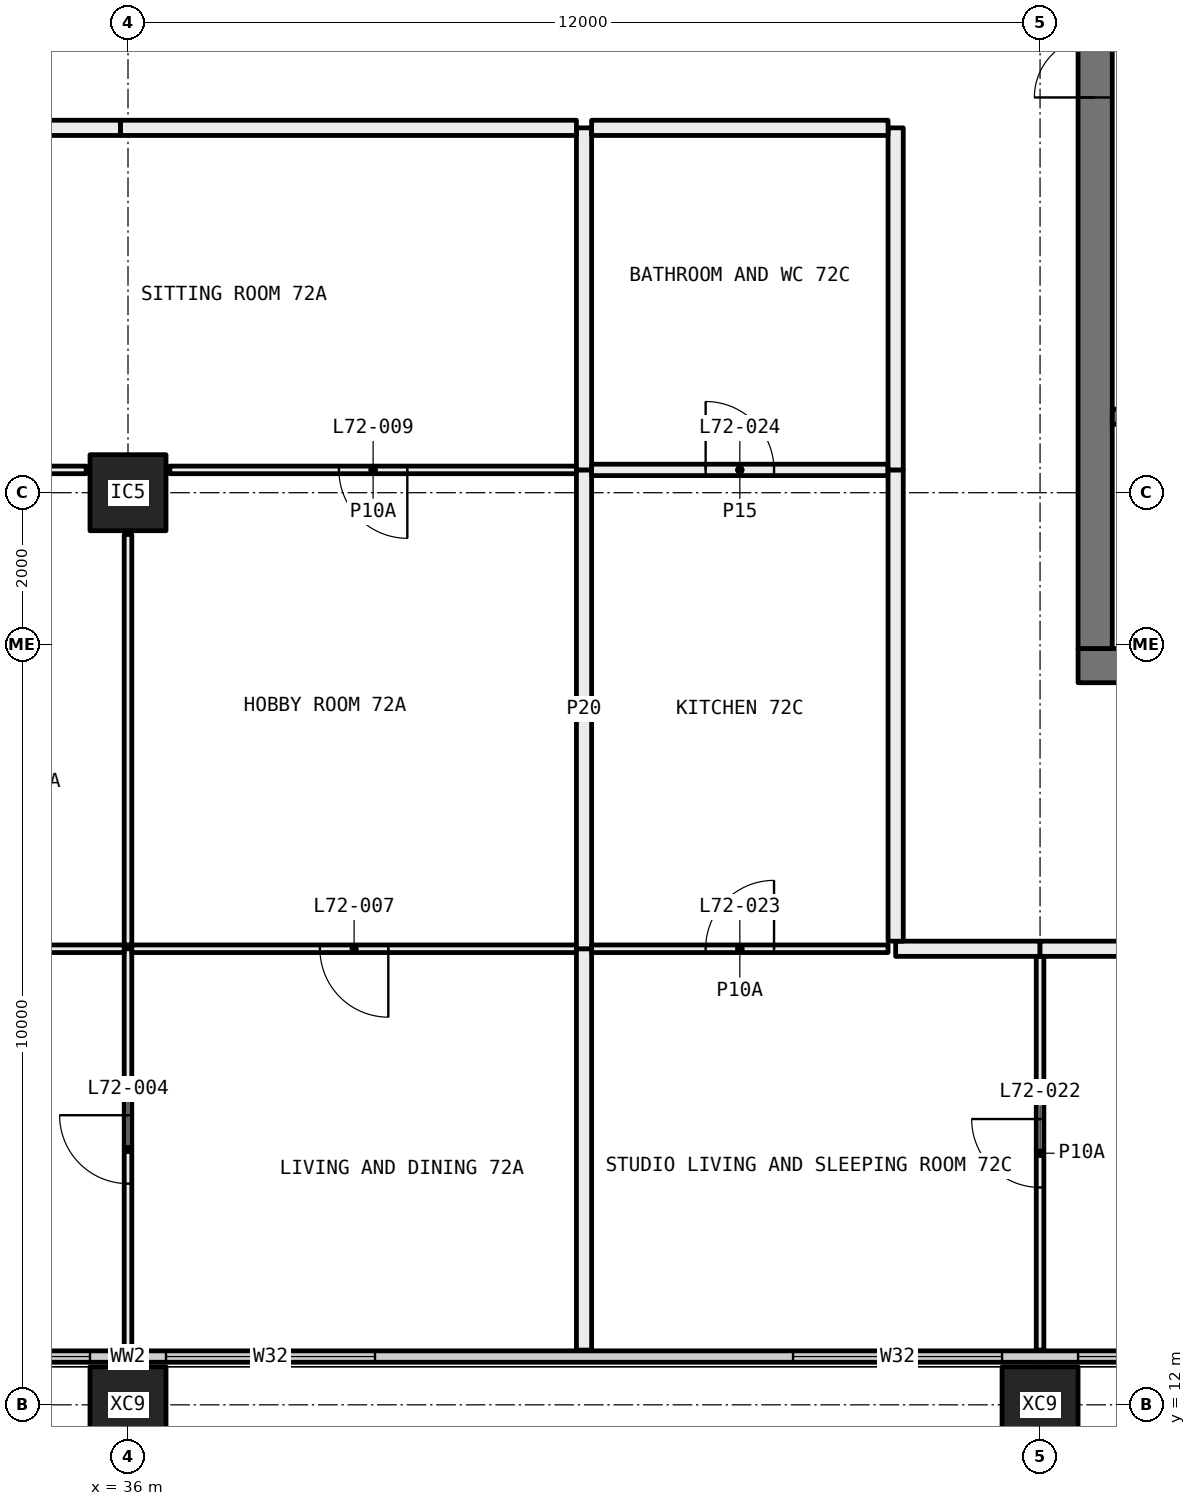
"""IFC4 building model, lengths in metres.
Left out: names, types, materials, properties, quantities, classifications, styles, units other than length and angle.
Written with IfcOpenShell. Run it as: python <this file> out.ifc"""

import sys

from ifc_helpers import new_model, si_unit, direction, frame, frame_2d, origin, origin_2d, place, context, subcontext, project, spatial, rectangle, hollow_rectangle, extrude, element, fill, save


model = new_model("IFC4")
c1 = context("Model", 3, precision=1e-05, world=origin(), true_north=direction((0.0, 1.0)))
c2 = subcontext(c1, "Body", "Model", "MODEL_VIEW")
j1 = project(units=[si_unit("LENGTHUNIT", "METRE"), si_unit("PLANEANGLEUNIT", "RADIAN")], contexts=[c1])
p1 = place(None, origin())
s1 = spatial("IfcSite", under=j1, at=p1, CompositionType="ELEMENT")
p2 = place(p1, origin())
s2 = spatial("IfcBuilding", under=s1, at=p2, CompositionType="ELEMENT")
p3 = place(p2, frame((0.0, 0.0, 266.25)))
s3 = spatial("IfcBuildingStorey", under=s2, at=p3, CompositionType="ELEMENT", Elevation=266.25)
p4 = place(p3, frame((36.0, 12.0, -0.4), z_axis=(0.0, 0.0, 1.0), x_axis=(1.0, 0.0, 0.0)))
e1 = element("IfcColumn", 1, at=p4, inside=s3, PredefinedType="COLUMN", context=c2, shape_type="SweptSolid", body=[
    extrude(hollow_rectangle(XDim=1.0, YDim=1.0, WallThickness=0.036, at=origin_2d()), origin(), (0.0, 0.0, 1.0), 3.45),
])
p5 = place(p3, frame((36.0, 24.0, 0.0), z_axis=(0.0, 0.0, 1.0), x_axis=(1.0, 0.0, 0.0)))
e2 = element("IfcColumn", 2, at=p5, inside=s3, PredefinedType="COLUMN", context=c2, shape_type="SweptSolid", body=[
    extrude(hollow_rectangle(XDim=1.0, YDim=1.0, WallThickness=0.04, at=origin_2d()), origin(), (0.0, 0.0, 1.0), 3.05),
])
p6 = place(p3, frame((48.0, 12.0, -0.4), z_axis=(0.0, 0.0, 1.0), x_axis=(1.0, 0.0, 0.0)))
e3 = element("IfcColumn", 3, at=p6, inside=s3, PredefinedType="COLUMN", context=c2, shape_type="SweptSolid", body=[
    extrude(hollow_rectangle(XDim=1.0, YDim=1.0, WallThickness=0.036, at=origin_2d()), origin(), (0.0, 0.0, 1.0), 3.45),
])
p7 = place(p3, frame((18.56, 12.635, 0.0), z_axis=(0.0, 0.0, 1.0), x_axis=(1.0, 0.0, 0.0)))
e4 = element("IfcWall", 4, at=p7, inside=s3, PredefinedType="ELEMENTEDWALL", context=c2, shape_type="SweptSolid", body=[
    extrude(rectangle(XDim=34.88, YDim=0.15, at=frame_2d((17.44, 0.0))), origin(), (0.0, 0.0, 1.0), 3.05),
])
p8 = place(p7, frame((0.44, 0.0, 0.45)))
e5 = element("IfcOpeningElement", 5, at=p8, cuts=e4, PredefinedType="OPENING", context=c2, shape_type="SweptSolid", body=[
    extrude(rectangle(XDim=4.5, YDim=2.55, at=frame_2d((2.25, 1.275))), frame((0.0, 0.085, 0.0), z_axis=(0.0, -1.0, 0.0), x_axis=(1.0, 0.0, 0.0)), (0.0, 0.0, 1.0), 0.17),
])
p9 = place(p7, frame((5.94, 0.0, 0.45)))
e6 = element("IfcOpeningElement", 6, at=p9, cuts=e4, PredefinedType="OPENING", context=c2, shape_type="SweptSolid", body=[
    extrude(rectangle(XDim=2.75, YDim=2.55, at=frame_2d((1.375, 1.275))), frame((0.0, 0.085, 0.0), z_axis=(0.0, -1.0, 0.0), x_axis=(1.0, 0.0, 0.0)), (0.0, 0.0, 1.0), 0.17),
])
p10 = place(p7, frame((14.94, 0.0, 0.45)))
e7 = element("IfcOpeningElement", 7, at=p10, cuts=e4, PredefinedType="OPENING", context=c2, shape_type="SweptSolid", body=[
    extrude(rectangle(XDim=2.0, YDim=2.55, at=frame_2d((1.0, 1.275))), frame((0.0, 0.085, 0.0), z_axis=(0.0, -1.0, 0.0), x_axis=(1.0, 0.0, 0.0)), (0.0, 0.0, 1.0), 0.17),
])
p11 = place(p7, frame((17.94, 0.0, 0.45)))
e8 = element("IfcOpeningElement", 8, at=p11, cuts=e4, PredefinedType="OPENING", context=c2, shape_type="SweptSolid", body=[
    extrude(rectangle(XDim=2.75, YDim=2.55, at=frame_2d((1.375, 1.275))), frame((0.0, 0.085, 0.0), z_axis=(0.0, -1.0, 0.0), x_axis=(1.0, 0.0, 0.0)), (0.0, 0.0, 1.0), 0.17),
])
p12 = place(p7, frame((26.19, 0.0, 0.45)))
e9 = element("IfcOpeningElement", 9, at=p12, cuts=e4, PredefinedType="OPENING", context=c2, shape_type="SweptSolid", body=[
    extrude(rectangle(XDim=2.75, YDim=2.55, at=frame_2d((1.375, 1.275))), frame((0.0, 0.085, 0.0), z_axis=(0.0, -1.0, 0.0), x_axis=(1.0, 0.0, 0.0)), (0.0, 0.0, 1.0), 0.17),
])
p13 = place(p7, frame((29.94, 0.0, 0.45)))
e10 = element("IfcOpeningElement", 10, at=p13, cuts=e4, PredefinedType="OPENING", context=c2, shape_type="SweptSolid", body=[
    extrude(rectangle(XDim=4.5, YDim=2.55, at=frame_2d((2.25, 1.275))), frame((0.0, 0.085, 0.0), z_axis=(0.0, -1.0, 0.0), x_axis=(1.0, 0.0, 0.0)), (0.0, 0.0, 1.0), 0.17),
])
p14 = place(p3, frame((36.0, 12.72, 0.0), z_axis=(0.0, 0.0, 1.0), x_axis=(0.0, 1.0, 0.0)))
e11 = element("IfcWall", 11, at=p14, inside=s3, PredefinedType="PARTITIONING", context=c2, shape_type="SweptSolid", body=[
    extrude(rectangle(XDim=5.28, YDim=0.1, at=frame_2d((2.64, 0.0))), origin(), (0.0, 0.0, 1.0), 2.45),
])
p15 = place(p14, frame((2.19, 0.0, 0.0)))
e12 = element("IfcOpeningElement", 12, at=p15, cuts=e11, PredefinedType="OPENING", context=c2, shape_type="SweptSolid", body=[
    extrude(rectangle(XDim=0.9, YDim=2.1, at=frame_2d((0.45, 1.05))), frame((0.0, 0.06, 0.0), z_axis=(0.0, -1.0, 0.0), x_axis=(1.0, 0.0, 0.0)), (0.0, 0.0, 1.0), 0.12),
])
p16 = place(p3, frame((35.95, 18.0, 0.0), z_axis=(0.0, 0.0, 1.0), x_axis=(-1.0, 0.0, 0.0)))
e13 = element("IfcWall", 13, at=p16, inside=s3, PredefinedType="PARTITIONING", context=c2, shape_type="SweptSolid", body=[
    extrude(rectangle(XDim=4.45, YDim=0.1, at=frame_2d((2.225, 0.0))), origin(), (0.0, 0.0, 1.0), 2.45),
])
p17 = place(p3, frame((41.9, 18.0, 0.0), z_axis=(0.0, 0.0, 1.0), x_axis=(-1.0, 0.0, 0.0)))
e14 = element("IfcWall", 14, at=p17, inside=s3, PredefinedType="PARTITIONING", context=c2, shape_type="SweptSolid", body=[
    extrude(rectangle(XDim=5.85, YDim=0.1, at=frame_2d((2.925, 0.0))), origin(), (0.0, 0.0, 1.0), 2.45),
])
p18 = place(p17, frame((2.475, 0.0, 0.0)))
e15 = element("IfcOpeningElement", 15, at=p18, cuts=e14, PredefinedType="OPENING", context=c2, shape_type="SweptSolid", body=[
    extrude(rectangle(XDim=0.9, YDim=2.1, at=frame_2d((0.45, 1.05))), frame((0.0, 0.06, 0.0), z_axis=(0.0, -1.0, 0.0), x_axis=(1.0, 0.0, 0.0)), (0.0, 0.0, 1.0), 0.12),
])
p19 = place(p3, frame((42.0, 12.72, 0.0), z_axis=(0.0, 0.0, 1.0), x_axis=(0.0, 1.0, 0.0)))
e16 = element("IfcWall", 16, at=p19, inside=s3, PredefinedType="PARTITIONING", context=c2, shape_type="SweptSolid", body=[
    extrude(rectangle(XDim=5.28, YDim=0.2, at=frame_2d((2.64, 0.0))), origin(), (0.0, 0.0, 1.0), 3.05),
])
p20 = place(p3, frame((36.0, 18.05, 0.0), z_axis=(0.0, 0.0, 1.0), x_axis=(0.0, 1.0, 0.0)))
e17 = element("IfcWall", 17, at=p20, inside=s3, PredefinedType="PARTITIONING", context=c2, shape_type="SweptSolid", body=[
    extrude(rectangle(XDim=5.4, YDim=0.1, at=frame_2d((2.7, 0.0))), origin(), (0.0, 0.0, 1.0), 2.45),
])
p21 = place(p3, frame((35.45, 24.3, 0.0), z_axis=(0.0, 0.0, 1.0), x_axis=(-1.0, 0.0, 0.0)))
e18 = element("IfcWall", 18, at=p21, inside=s3, PredefinedType="PARTITIONING", context=c2, shape_type="SweptSolid", body=[
    extrude(rectangle(XDim=3.9, YDim=0.1, at=frame_2d((1.95, 0.0))), origin(), (0.0, 0.0, 1.0), 3.05),
])
p22 = place(p3, frame((41.9, 24.3, 0.0), z_axis=(0.0, 0.0, 1.0), x_axis=(-1.0, 0.0, 0.0)))
e19 = element("IfcWall", 19, at=p22, inside=s3, PredefinedType="PARTITIONING", context=c2, shape_type="SweptSolid", body=[
    extrude(rectangle(XDim=5.35, YDim=0.1, at=frame_2d((2.675, 0.0))), origin(), (0.0, 0.0, 1.0), 3.05),
])
p23 = place(p22, frame((2.225, 0.0, 0.0)))
e20 = element("IfcOpeningElement", 20, at=p23, cuts=e19, PredefinedType="OPENING", context=c2, shape_type="SweptSolid", body=[
    extrude(rectangle(XDim=0.9, YDim=2.1, at=frame_2d((0.45, 1.05))), frame((0.0, 0.06, 0.0), z_axis=(0.0, -1.0, 0.0), x_axis=(1.0, 0.0, 0.0)), (0.0, 0.0, 1.0), 0.12),
])
p24 = place(p3, frame((42.0, 18.0, 0.0), z_axis=(0.0, 0.0, 1.0), x_axis=(0.0, 1.0, 0.0)))
e21 = element("IfcWall", 21, at=p24, inside=s3, PredefinedType="PARTITIONING", context=c2, shape_type="SweptSolid", body=[
    extrude(rectangle(XDim=6.3, YDim=0.2, at=frame_2d((3.15, 0.0))), origin(), (0.0, 0.0, 1.0), 2.45),
])
p25 = place(p3, frame((42.0, 24.3, 0.0), z_axis=(0.0, 0.0, 1.0), x_axis=(0.0, 1.0, 0.0)))
e22 = element("IfcWall", 22, at=p25, inside=s3, PredefinedType="PARTITIONING", context=c2, shape_type="SweptSolid", body=[
    extrude(rectangle(XDim=4.5, YDim=0.2, at=frame_2d((2.25, 0.0))), origin(), (0.0, 0.0, 1.0), 3.05),
])
p26 = place(p3, frame((41.9, 28.8, 0.0), z_axis=(0.0, 0.0, 1.0), x_axis=(-1.0, 0.0, 0.0)))
e23 = element("IfcWall", 23, at=p26, inside=s3, PredefinedType="PARTITIONING", context=c2, shape_type="SweptSolid", body=[
    extrude(rectangle(XDim=6.0, YDim=0.2, at=frame_2d((3.0, 0.0))), origin(), (0.0, 0.0, 1.0), 2.45),
])
p27 = place(p3, frame((35.9, 28.8, 0.0), z_axis=(0.0, 0.0, 1.0), x_axis=(-1.0, 0.0, 0.0)))
e24 = element("IfcWall", 24, at=p27, inside=s3, PredefinedType="PARTITIONING", context=c2, shape_type="SweptSolid", body=[
    extrude(rectangle(XDim=5.9, YDim=0.2, at=frame_2d((2.95, 0.0))), origin(), (0.0, 0.0, 1.0), 3.05),
])
p28 = place(p3, frame((48.0, 12.72, 0.0), z_axis=(0.0, 0.0, 1.0), x_axis=(0.0, 1.0, 0.0)))
e25 = element("IfcWall", 25, at=p28, inside=s3, PredefinedType="PARTITIONING", context=c2, shape_type="SweptSolid", body=[
    extrude(rectangle(XDim=5.18, YDim=0.1, at=frame_2d((2.59, 0.0))), origin(), (0.0, 0.0, 1.0), 3.05),
])
p29 = place(p28, frame((2.14, 0.0, 0.0)))
e26 = element("IfcOpeningElement", 26, at=p29, cuts=e25, PredefinedType="OPENING", context=c2, shape_type="SweptSolid", body=[
    extrude(rectangle(XDim=0.9, YDim=2.1, at=frame_2d((0.45, 1.05))), frame((0.0, 0.06, 0.0), z_axis=(0.0, -1.0, 0.0), x_axis=(1.0, 0.0, 0.0)), (0.0, 0.0, 1.0), 0.12),
])
p30 = place(p3, frame((46.0, 18.0, 0.0), z_axis=(0.0, 0.0, 1.0), x_axis=(-1.0, 0.0, 0.0)))
e27 = element("IfcWall", 27, at=p30, inside=s3, PredefinedType="PARTITIONING", context=c2, shape_type="SweptSolid", body=[
    extrude(rectangle(XDim=3.9, YDim=0.1, at=frame_2d((1.95, 0.0))), origin(), (0.0, 0.0, 1.0), 3.05),
])
p31 = place(p30, frame((1.5, 0.0, 0.0)))
e28 = element("IfcOpeningElement", 28, at=p31, cuts=e27, PredefinedType="OPENING", context=c2, shape_type="SweptSolid", body=[
    extrude(rectangle(XDim=0.9, YDim=2.1, at=frame_2d((0.45, 1.05))), frame((0.0, 0.06, 0.0), z_axis=(0.0, -1.0, 0.0), x_axis=(1.0, 0.0, 0.0)), (0.0, 0.0, 1.0), 0.12),
])
p32 = place(p3, frame((48.0, 18.0, 0.0), z_axis=(0.0, 0.0, 1.0), x_axis=(-1.0, 0.0, 0.0)))
e29 = element("IfcWall", 29, at=p32, inside=s3, PredefinedType="PARTITIONING", context=c2, shape_type="SweptSolid", body=[
    extrude(rectangle(XDim=1.9, YDim=0.2, at=frame_2d((0.95, 0.0))), origin(), (0.0, 0.0, 1.0), 3.05),
])
p33 = place(p3, frame((53.28, 18.0, 0.0), z_axis=(0.0, 0.0, 1.0), x_axis=(-1.0, 0.0, 0.0)))
e30 = element("IfcWall", 30, at=p33, inside=s3, PredefinedType="PARTITIONING", context=c2, shape_type="SweptSolid", body=[
    extrude(rectangle(XDim=5.28, YDim=0.2, at=frame_2d((2.64, 0.0))), origin(), (0.0, 0.0, 1.0), 3.05),
])
p34 = place(p33, frame((2.14, 0.0, 0.0)))
e31 = element("IfcOpeningElement", 31, at=p34, cuts=e30, PredefinedType="OPENING", context=c2, shape_type="SweptSolid", body=[
    extrude(rectangle(XDim=1.0, YDim=2.1, at=frame_2d((0.5, 1.05))), frame((0.0, 0.11, 0.0), z_axis=(0.0, -1.0, 0.0), x_axis=(1.0, 0.0, 0.0)), (0.0, 0.0, 1.0), 0.22),
])
p35 = place(p3, frame((46.0, 24.3, 0.0), z_axis=(0.0, 0.0, 1.0), x_axis=(-1.0, 0.0, 0.0)))
e32 = element("IfcWall", 32, at=p35, inside=s3, PredefinedType="PARTITIONING", context=c2, shape_type="SweptSolid", body=[
    extrude(rectangle(XDim=3.9, YDim=0.15, at=frame_2d((1.95, 0.0))), origin(), (0.0, 0.0, 1.0), 3.05),
])
p36 = place(p35, frame((1.5, 0.0, 0.0)))
e33 = element("IfcOpeningElement", 33, at=p36, cuts=e32, PredefinedType="OPENING", context=c2, shape_type="SweptSolid", body=[
    extrude(rectangle(XDim=0.9, YDim=2.1, at=frame_2d((0.45, 1.05))), frame((0.0, 0.085, 0.0), z_axis=(0.0, -1.0, 0.0), x_axis=(1.0, 0.0, 0.0)), (0.0, 0.0, 1.0), 0.17),
])
p37 = place(p3, frame((46.1, 18.1, 0.0), z_axis=(0.0, 0.0, 1.0), x_axis=(0.0, 1.0, 0.0)))
e34 = element("IfcWall", 34, at=p37, inside=s3, PredefinedType="PARTITIONING", context=c2, shape_type="SweptSolid", body=[
    extrude(rectangle(XDim=6.2, YDim=0.2, at=frame_2d((3.1, 0.0))), origin(), (0.0, 0.0, 1.0), 2.45),
])
p38 = place(p3, frame((46.1, 24.3, 0.0), z_axis=(0.0, 0.0, 1.0), x_axis=(0.0, 1.0, 0.0)))
e35 = element("IfcWall", 35, at=p38, inside=s3, PredefinedType="PARTITIONING", context=c2, shape_type="SweptSolid", body=[
    extrude(rectangle(XDim=4.5, YDim=0.2, at=frame_2d((2.25, 0.0))), origin(), (0.0, 0.0, 1.0), 3.05),
])
p39 = place(p3, frame((46.0, 28.8, 0.0), z_axis=(0.0, 0.0, 1.0), x_axis=(-1.0, 0.0, 0.0)))
e36 = element("IfcWall", 36, at=p39, inside=s3, PredefinedType="PARTITIONING", context=c2, shape_type="SweptSolid", body=[
    extrude(rectangle(XDim=3.9, YDim=0.2, at=frame_2d((1.95, 0.0))), origin(), (0.0, 0.0, 1.0), 3.05),
])
p40 = place(p3, frame((59.5, 21.725, 0.0), z_axis=(0.0, 0.0, 1.0), x_axis=(-1.0, 0.0, 0.0)))
e37 = element("IfcWall", 37, at=p40, inside=s3, PredefinedType="SHEAR", context=c2, shape_type="SweptSolid", body=[
    extrude(rectangle(XDim=11.0, YDim=0.45, at=frame_2d((5.5, 0.0))), origin(), (0.0, 0.0, 1.0), 3.05),
])
p41 = place(p40, frame((1.125, 0.0, 0.0)))
e38 = element("IfcOpeningElement", 38, at=p41, cuts=e37, PredefinedType="OPENING", context=c2, shape_type="SweptSolid", body=[
    extrude(rectangle(XDim=1.0, YDim=2.1, at=frame_2d((0.5, 1.05))), frame((0.0, 0.235, 0.0), z_axis=(0.0, -1.0, 0.0), x_axis=(1.0, 0.0, 0.0)), (0.0, 0.0, 1.0), 0.47),
])
p42 = place(p3, frame((48.725, 21.95, 0.0), z_axis=(0.0, 0.0, 1.0), x_axis=(0.0, 1.0, 0.0)))
e39 = element("IfcWall", 39, at=p42, inside=s3, PredefinedType="SHEAR", context=c2, shape_type="SweptSolid", body=[
    extrude(rectangle(XDim=16.1, YDim=0.45, at=frame_2d((8.05, 0.0))), origin(), (0.0, 0.0, 1.0), 3.05),
])
p43 = place(p42, frame((7.25, 0.0, 0.0)))
e40 = element("IfcOpeningElement", 40, at=p43, cuts=e39, PredefinedType="OPENING", context=c2, shape_type="SweptSolid", body=[
    extrude(rectangle(XDim=1.6, YDim=2.1, at=frame_2d((0.8, 1.05))), frame((0.0, 0.235, 0.0), z_axis=(0.0, -1.0, 0.0), x_axis=(1.0, 0.0, 0.0)), (0.0, 0.0, 1.0), 0.47),
])
p44 = place(p3, frame((56.5, 25.0, 0.0), z_axis=(0.0, 0.0, 1.0), x_axis=(-1.0, 0.0, 0.0)))
e41 = element("IfcWall", 41, at=p44, inside=s3, PredefinedType="SOLIDWALL", context=c2, shape_type="SweptSolid", body=[
    extrude(rectangle(XDim=7.55, YDim=0.2, at=frame_2d((3.775, 0.0))), origin(), (0.0, 0.0, 1.0), 3.05),
])
p45 = place(p10, origin())
e42 = element("IfcWindow", 42, at=p45, inside=s3, PartitioningType="SINGLE_PANEL", PredefinedType="WINDOW", context=c2, shape_type="SweptSolid", body=[
    extrude(rectangle(XDim=2.0, YDim=2.55, at=frame_2d((1.0, 1.275))), frame((0.0, 0.03, 0.0), z_axis=(0.0, -1.0, 0.0), x_axis=(1.0, 0.0, 0.0)), (0.0, 0.0, 1.0), 0.06),
])
fill(e7, e42)
p46 = place(p11, origin())
e43 = element("IfcWindow", 43, at=p46, inside=s3, PartitioningType="SINGLE_PANEL", PredefinedType="WINDOW", context=c2, shape_type="SweptSolid", body=[
    extrude(rectangle(XDim=2.75, YDim=2.55, at=frame_2d((1.375, 1.275))), frame((0.0, 0.03, 0.0), z_axis=(0.0, -1.0, 0.0), x_axis=(1.0, 0.0, 0.0)), (0.0, 0.0, 1.0), 0.06),
])
fill(e8, e43)
p47 = place(p12, origin())
e44 = element("IfcWindow", 44, at=p47, inside=s3, PartitioningType="SINGLE_PANEL", PredefinedType="WINDOW", context=c2, shape_type="SweptSolid", body=[
    extrude(rectangle(XDim=2.75, YDim=2.55, at=frame_2d((1.375, 1.275))), frame((0.0, 0.03, 0.0), z_axis=(0.0, -1.0, 0.0), x_axis=(1.0, 0.0, 0.0)), (0.0, 0.0, 1.0), 0.06),
])
fill(e9, e44)
p48 = place(p13, origin())
e45 = element("IfcWindow", 45, at=p48, inside=s3, PartitioningType="SINGLE_PANEL", PredefinedType="WINDOW", context=c2, shape_type="SweptSolid", body=[
    extrude(rectangle(XDim=4.5, YDim=2.55, at=frame_2d((2.25, 1.275))), frame((0.0, 0.03, 0.0), z_axis=(0.0, -1.0, 0.0), x_axis=(1.0, 0.0, 0.0)), (0.0, 0.0, 1.0), 0.06),
])
fill(e10, e45)
p49 = place(p15, origin())
e46 = element("IfcDoor", 46, at=p49, inside=s3, OperationType="SINGLE_SWING_LEFT", PredefinedType="DOOR", context=c2, shape_type="SweptSolid", body=[
    extrude(rectangle(XDim=0.9, YDim=2.1, at=frame_2d((0.45, 1.05))), frame((0.0, 0.025, 0.0), z_axis=(0.0, -1.0, 0.0), x_axis=(1.0, 0.0, 0.0)), (0.0, 0.0, 1.0), 0.05),
])
fill(e12, e46)
p50 = place(p18, origin())
e47 = element("IfcDoor", 47, at=p50, inside=s3, OperationType="SINGLE_SWING_RIGHT", PredefinedType="DOOR", context=c2, shape_type="SweptSolid", body=[
    extrude(rectangle(XDim=0.9, YDim=2.1, at=frame_2d((0.45, 1.05))), frame((0.0, 0.025, 0.0), z_axis=(0.0, -1.0, 0.0), x_axis=(1.0, 0.0, 0.0)), (0.0, 0.0, 1.0), 0.05),
])
fill(e15, e47)
p51 = place(p23, origin())
e48 = element("IfcDoor", 48, at=p51, inside=s3, OperationType="SINGLE_SWING_RIGHT", PredefinedType="DOOR", context=c2, shape_type="SweptSolid", body=[
    extrude(rectangle(XDim=0.9, YDim=2.1, at=frame_2d((0.45, 1.05))), frame((0.0, 0.025, 0.0), z_axis=(0.0, -1.0, 0.0), x_axis=(1.0, 0.0, 0.0)), (0.0, 0.0, 1.0), 0.05),
])
fill(e20, e48)
p52 = place(p29, origin())
e49 = element("IfcDoor", 49, at=p52, inside=s3, OperationType="SINGLE_SWING_LEFT", PredefinedType="DOOR", context=c2, shape_type="SweptSolid", body=[
    extrude(rectangle(XDim=0.9, YDim=2.1, at=frame_2d((0.45, 1.05))), frame((0.0, 0.025, 0.0), z_axis=(0.0, -1.0, 0.0), x_axis=(1.0, 0.0, 0.0)), (0.0, 0.0, 1.0), 0.05),
])
fill(e26, e49)
p53 = place(p31, frame((0.9, 0.0, 0.0), x_axis=(-1.0, 0.0, 0.0)))
e50 = element("IfcDoor", 50, at=p53, inside=s3, OperationType="SINGLE_SWING_LEFT", PredefinedType="DOOR", context=c2, shape_type="SweptSolid", body=[
    extrude(rectangle(XDim=0.9, YDim=2.1, at=frame_2d((0.45, 1.05))), frame((0.0, 0.025, 0.0), z_axis=(0.0, -1.0, 0.0), x_axis=(1.0, 0.0, 0.0)), (0.0, 0.0, 1.0), 0.05),
])
fill(e28, e50)
p54 = place(p36, frame((0.9, 0.0, 0.0), x_axis=(-1.0, 0.0, 0.0)))
e51 = element("IfcDoor", 51, at=p54, inside=s3, OperationType="SINGLE_SWING_RIGHT", PredefinedType="DOOR", context=c2, shape_type="SweptSolid", body=[
    extrude(rectangle(XDim=0.9, YDim=2.1, at=frame_2d((0.45, 1.05))), frame((0.0, 0.025, 0.0), z_axis=(0.0, -1.0, 0.0), x_axis=(1.0, 0.0, 0.0)), (0.0, 0.0, 1.0), 0.05),
])
fill(e33, e51)
p55 = place(p43, origin())
e52 = element("IfcDoor", 52, at=p55, inside=s3, OperationType="DOUBLE_DOOR_SINGLE_SWING", PredefinedType="DOOR", context=c2, shape_type="SweptSolid", body=[
    extrude(rectangle(XDim=1.6, YDim=2.1, at=frame_2d((0.8, 1.05))), frame((0.0, 0.025, 0.0), z_axis=(0.0, -1.0, 0.0), x_axis=(1.0, 0.0, 0.0)), (0.0, 0.0, 1.0), 0.05),
])
fill(e40, e52)
save(model, sys.argv[1])
